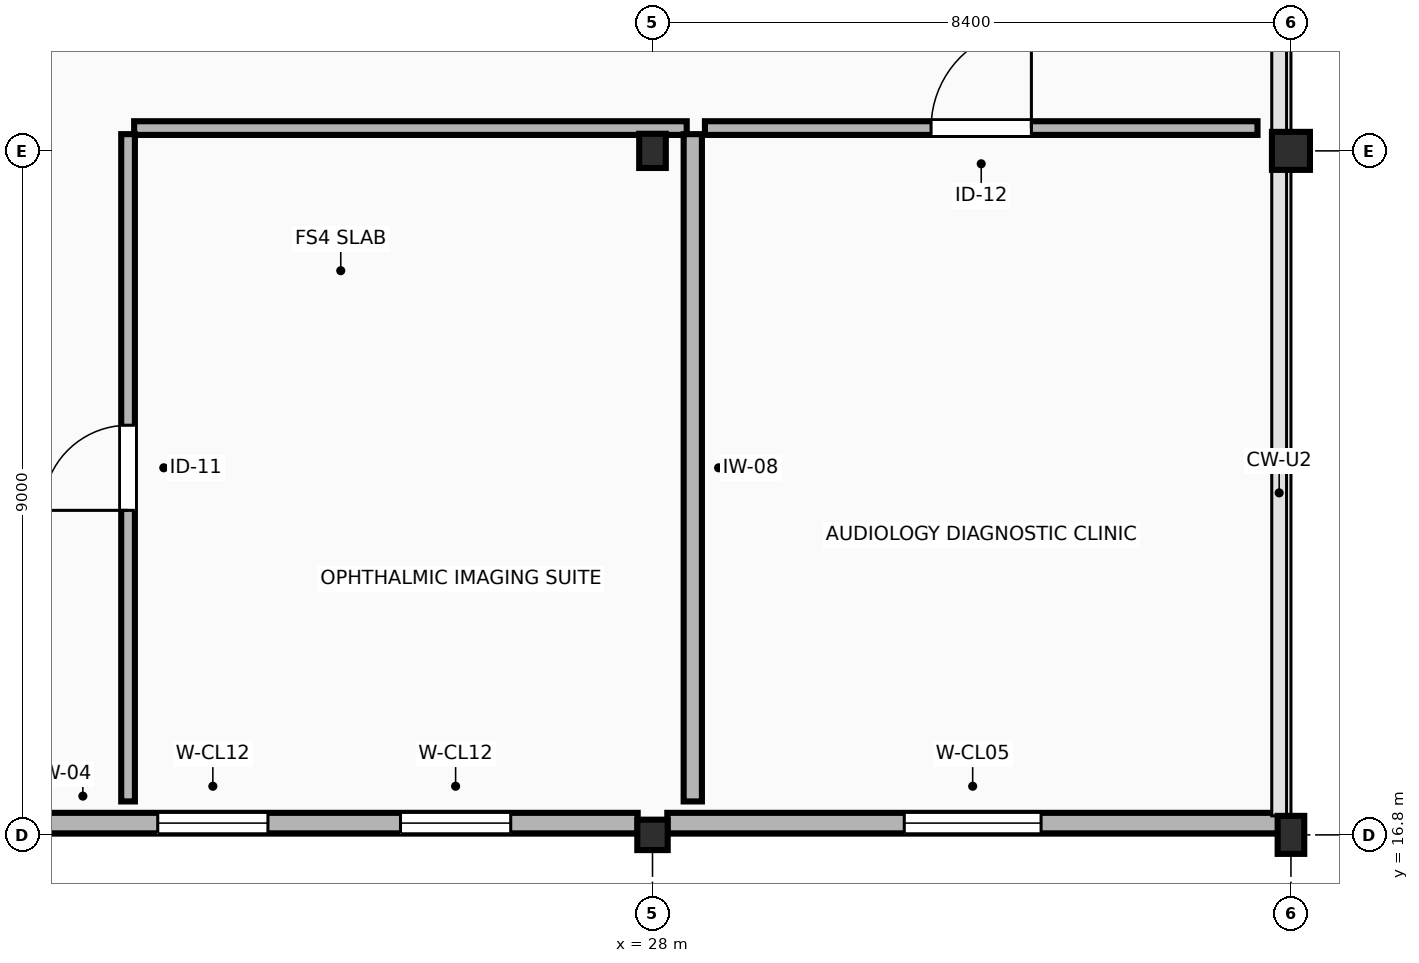
"""IFC4 building model, lengths in metres.
Left out: names, types, materials, properties, quantities, classifications, styles, units other than length and angle.
Written with IfcOpenShell. Run it as: python <this file> out.ifc"""

import sys

from ifc_helpers import new_model, si_unit, direction, frame, frame_2d, origin, origin_2d, place, context, subcontext, project, spatial, rectangle, extrude, element, fill, save


model = new_model("IFC4")
c1 = context("Model", 3, precision=1e-05, world=origin(), true_north=direction((0.0, 1.0)))
c2 = subcontext(c1, "Body", "Model", "MODEL_VIEW")
j1 = project(units=[si_unit("LENGTHUNIT", "METRE"), si_unit("PLANEANGLEUNIT", "RADIAN")], contexts=[c1])
p1 = place(None, origin())
s1 = spatial("IfcSite", under=j1, at=p1, CompositionType="ELEMENT")
p2 = place(p1, origin())
s2 = spatial("IfcBuilding", under=s1, at=p2, CompositionType="ELEMENT")
p3 = place(p2, frame((0.0, 0.0, 18.0)))
s3 = spatial("IfcBuildingStorey", under=s2, at=p3, CompositionType="ELEMENT", Elevation=18.0)
p4 = place(p3, frame((28.0, 16.8, 0.0), z_axis=(0.0, 0.0, 1.0), x_axis=(1.0, 0.0, 0.0)))
e1 = element("IfcColumn", 1, at=p4, inside=s3, PredefinedType="COLUMN", context=c2, shape_type="SweptSolid", body=[
    extrude(rectangle(XDim=0.4, YDim=0.4, at=origin_2d()), origin(), (0.0, 0.0, 1.0), 4.2),
])
p5 = place(p3, frame((28.0, 25.8, 0.0), z_axis=(0.0, 0.0, 1.0), x_axis=(1.0, 0.0, 0.0)))
e2 = element("IfcColumn", 2, at=p5, inside=s3, PredefinedType="COLUMN", context=c2, shape_type="SweptSolid", body=[
    extrude(rectangle(XDim=0.35, YDim=0.45, at=origin_2d()), origin(), (0.0, 0.0, 1.0), 4.2),
])
p6 = place(p3, frame((36.4, 16.8, 0.0), z_axis=(0.0, 0.0, 1.0), x_axis=(1.0, 0.0, 0.0)))
e3 = element("IfcColumn", 3, at=p6, inside=s3, PredefinedType="COLUMN", context=c2, shape_type="SweptSolid", body=[
    extrude(rectangle(XDim=0.35, YDim=0.5, at=origin_2d()), origin(), (0.0, 0.0, 1.0), 4.2),
])
p7 = place(p3, frame((36.4, 25.8, 0.0), z_axis=(0.0, 0.0, 1.0), x_axis=(1.0, 0.0, 0.0)))
e4 = element("IfcColumn", 4, at=p7, inside=s3, PredefinedType="COLUMN", context=c2, shape_type="SweptSolid", body=[
    extrude(rectangle(XDim=0.5, YDim=0.5, at=origin_2d()), origin(), (0.0, 0.0, 1.0), 4.2),
])
p8 = place(p3, frame((19.82, 16.955, 0.0), z_axis=(0.0, 0.0, 1.0), x_axis=(1.0, 0.0, 0.0)))
e5 = element("IfcWall", 5, at=p8, inside=s3, PredefinedType="STANDARD", context=c2, shape_type="SweptSolid", body=[
    extrude(rectangle(XDim=7.985, YDim=0.27, at=frame_2d((3.992, 0.0))), origin(), (0.0, 0.0, 1.0), 3.275),
])
p9 = place(p8, frame((1.67, 0.0, 0.95)))
e6 = element("IfcOpeningElement", 6, at=p9, cuts=e5, PredefinedType="OPENING", context=c2, shape_type="SweptSolid", body=[
    extrude(rectangle(XDim=1.45, YDim=1.7, at=frame_2d((0.725, 0.85))), frame((0.0, 0.145, 0.0), z_axis=(0.0, -1.0, 0.0), x_axis=(1.0, 0.0, 0.0)), (0.0, 0.0, 1.0), 0.29),
])
p10 = place(p8, frame((4.865, 0.0, 0.95)))
e7 = element("IfcOpeningElement", 7, at=p10, cuts=e5, PredefinedType="OPENING", context=c2, shape_type="SweptSolid", body=[
    extrude(rectangle(XDim=1.45, YDim=1.7, at=frame_2d((0.725, 0.85))), frame((0.0, 0.145, 0.0), z_axis=(0.0, -1.0, 0.0), x_axis=(1.0, 0.0, 0.0)), (0.0, 0.0, 1.0), 0.29),
])
p11 = place(p3, frame((28.195, 16.955, 0.0), z_axis=(0.0, 0.0, 1.0), x_axis=(1.0, 0.0, 0.0)))
e8 = element("IfcWall", 8, at=p11, inside=s3, PredefinedType="STANDARD", context=c2, shape_type="SweptSolid", body=[
    extrude(rectangle(XDim=8.035, YDim=0.27, at=frame_2d((4.018, 0.0))), origin(), (0.0, 0.0, 1.0), 3.275),
])
p12 = place(p11, frame((3.117, 0.0, 0.95)))
e9 = element("IfcOpeningElement", 9, at=p12, cuts=e8, PredefinedType="OPENING", context=c2, shape_type="SweptSolid", body=[
    extrude(rectangle(XDim=1.8, YDim=1.5, at=frame_2d((0.9, 0.75))), frame((0.0, 0.145, 0.0), z_axis=(0.0, -1.0, 0.0), x_axis=(1.0, 0.0, 0.0)), (0.0, 0.0, 1.0), 0.29),
])
p13 = place(p3, frame((21.18, 26.1, 0.0), z_axis=(0.0, 0.0, 1.0), x_axis=(1.0, 0.0, 0.0)))
e10 = element("IfcWall", 10, at=p13, inside=s3, PredefinedType="PARTITIONING", context=c2, shape_type="SweptSolid", body=[
    extrude(rectangle(XDim=7.27, YDim=0.18, at=frame_2d((3.635, 0.0))), origin(), (0.0, 0.0, 1.0), 3.275),
])
p14 = place(p3, frame((28.53, 26.02, 0.0), z_axis=(0.0, 0.0, 1.0), x_axis=(0.0, -1.0, 0.0)))
e11 = element("IfcWall", 11, at=p14, inside=s3, PredefinedType="PARTITIONING", context=c2, shape_type="SweptSolid", body=[
    extrude(rectangle(XDim=8.78, YDim=0.24, at=frame_2d((4.39, 0.0))), origin(), (0.0, 0.0, 1.0), 3.325),
])
p15 = place(p3, frame((21.1, 17.24, 0.0), z_axis=(0.0, 0.0, 1.0), x_axis=(0.0, 1.0, 0.0)))
e12 = element("IfcWall", 12, at=p15, inside=s3, PredefinedType="PARTITIONING", context=c2, shape_type="SweptSolid", body=[
    extrude(rectangle(XDim=8.78, YDim=0.18, at=frame_2d((4.39, 0.0))), origin(), (0.0, 0.0, 1.0), 3.94),
])
p16 = place(p15, frame((3.83, 0.0, 0.0)))
e13 = element("IfcOpeningElement", 13, at=p16, cuts=e12, PredefinedType="OPENING", context=c2, shape_type="SweptSolid", body=[
    extrude(rectangle(XDim=1.12, YDim=2.16, at=frame_2d((0.56, 1.08))), frame((0.0, 0.1, 0.0), z_axis=(0.0, -1.0, 0.0), x_axis=(1.0, 0.0, 0.0)), (0.0, 0.0, 1.0), 0.2),
])
p17 = place(p3, frame((28.69, 26.1, 0.0), z_axis=(0.0, 0.0, 1.0), x_axis=(1.0, 0.0, 0.0)))
e14 = element("IfcWall", 14, at=p17, inside=s3, PredefinedType="PARTITIONING", context=c2, shape_type="SweptSolid", body=[
    extrude(rectangle(XDim=7.27, YDim=0.18, at=frame_2d((3.635, 0.0))), origin(), (0.0, 0.0, 1.0), 3.275),
])
p18 = place(p17, frame((2.975, 0.0, 0.0)))
e15 = element("IfcOpeningElement", 15, at=p18, cuts=e14, PredefinedType="OPENING", context=c2, shape_type="SweptSolid", body=[
    extrude(rectangle(XDim=1.32, YDim=2.22, at=frame_2d((0.66, 1.11))), frame((0.0, 0.1, 0.0), z_axis=(0.0, -1.0, 0.0), x_axis=(1.0, 0.0, 0.0)), (0.0, 0.0, 1.0), 0.2),
])
p19 = place(p9, origin())
e16 = element("IfcWindow", 16, at=p19, inside=s3, PartitioningType="SINGLE_PANEL", PredefinedType="WINDOW", context=c2, shape_type="SweptSolid", body=[
    extrude(rectangle(XDim=1.45, YDim=1.7, at=frame_2d((0.725, 0.85))), frame((0.0, 0.03, 0.0), z_axis=(0.0, -1.0, 0.0), x_axis=(1.0, 0.0, 0.0)), (0.0, 0.0, 1.0), 0.06),
])
fill(e6, e16)
p20 = place(p10, origin())
e17 = element("IfcWindow", 17, at=p20, inside=s3, PartitioningType="SINGLE_PANEL", PredefinedType="WINDOW", context=c2, shape_type="SweptSolid", body=[
    extrude(rectangle(XDim=1.45, YDim=1.7, at=frame_2d((0.725, 0.85))), frame((0.0, 0.03, 0.0), z_axis=(0.0, -1.0, 0.0), x_axis=(1.0, 0.0, 0.0)), (0.0, 0.0, 1.0), 0.06),
])
fill(e7, e17)
p21 = place(p12, origin())
e18 = element("IfcWindow", 18, at=p21, inside=s3, PartitioningType="SINGLE_PANEL", PredefinedType="WINDOW", context=c2, shape_type="SweptSolid", body=[
    extrude(rectangle(XDim=1.8, YDim=1.5, at=frame_2d((0.9, 0.75))), frame((0.0, 0.03, 0.0), z_axis=(0.0, -1.0, 0.0), x_axis=(1.0, 0.0, 0.0)), (0.0, 0.0, 1.0), 0.06),
])
fill(e9, e18)
p22 = place(p16, origin())
e19 = element("IfcDoor", 19, at=p22, inside=s3, OperationType="SINGLE_SWING_LEFT", PredefinedType="DOOR", context=c2, shape_type="SweptSolid", body=[
    extrude(rectangle(XDim=1.12, YDim=2.16, at=frame_2d((0.56, 1.08))), frame((0.0, 0.025, 0.0), z_axis=(0.0, -1.0, 0.0), x_axis=(1.0, 0.0, 0.0)), (0.0, 0.0, 1.0), 0.05),
])
fill(e13, e19)
p23 = place(p18, origin())
e20 = element("IfcDoor", 20, at=p23, inside=s3, OperationType="SINGLE_SWING_RIGHT", PredefinedType="DOOR", context=c2, shape_type="SweptSolid", body=[
    extrude(rectangle(XDim=1.32, YDim=2.22, at=frame_2d((0.66, 1.11))), frame((0.0, 0.025, 0.0), z_axis=(0.0, -1.0, 0.0), x_axis=(1.0, 0.0, 0.0)), (0.0, 0.0, 1.0), 0.05),
])
fill(e15, e20)
save(model, sys.argv[1])
